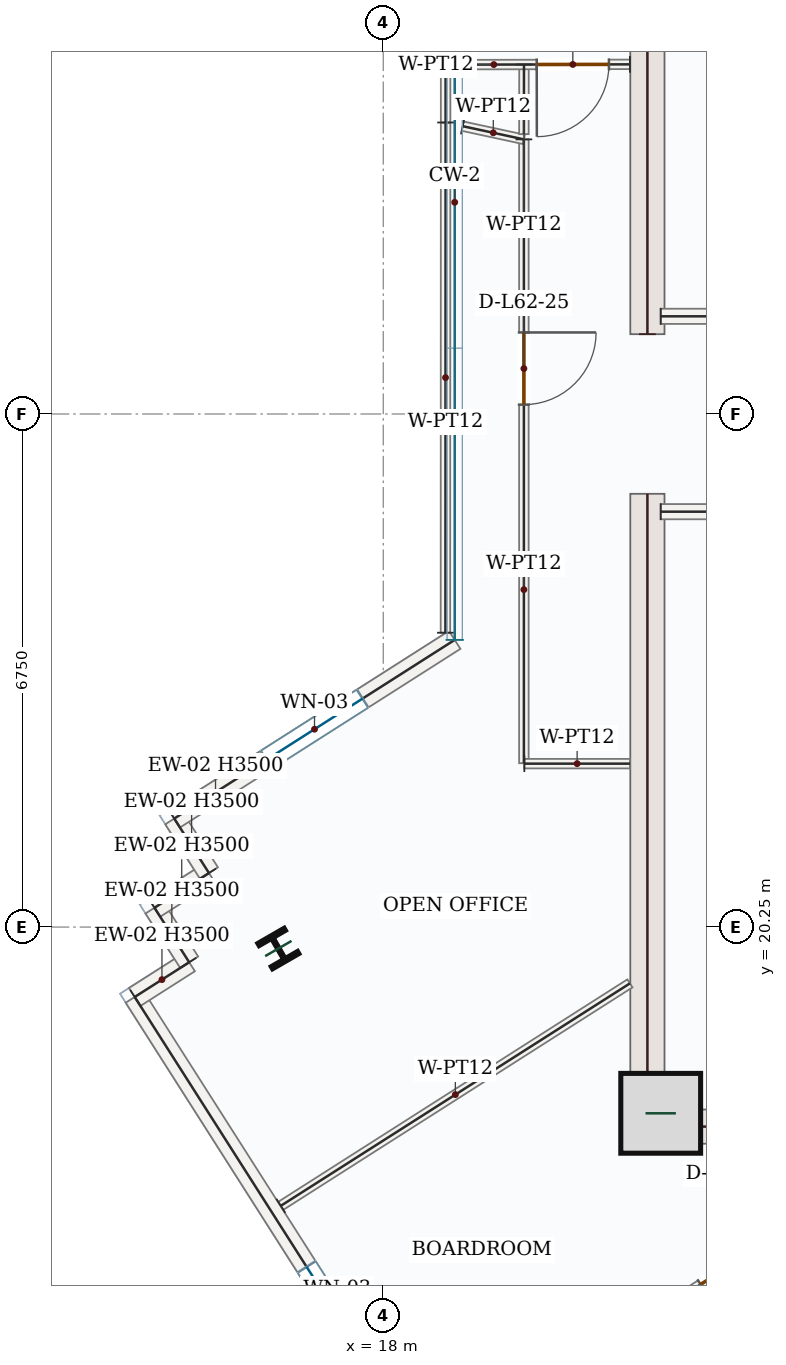
"""IFC4 building model, lengths in metres.
Left out: names, types, materials, properties, quantities, classifications, styles, units other than length and angle.
Written with IfcOpenShell. Run it as: python <this file> out.ifc"""

import sys

from ifc_helpers import new_model, si_unit, direction, frame, frame_2d, origin, origin_2d, place, context, subcontext, project, spatial, rectangle, i_section, extrude, source, transform, mapped, element, fill, save


model = new_model("IFC4")
c1 = context("Model", 3, precision=1e-05, world=origin(), true_north=direction((0.0, 1.0)))
c2 = subcontext(c1, "Body", "Model", "MODEL_VIEW")
j1 = project(units=[si_unit("LENGTHUNIT", "METRE"), si_unit("PLANEANGLEUNIT", "RADIAN")], contexts=[c1])
p1 = place(None, origin())
s1 = spatial("IfcSite", under=j1, at=p1, CompositionType="ELEMENT")
p2 = place(p1, origin())
s2 = spatial("IfcBuilding", under=s1, at=p2, CompositionType="ELEMENT")
p3 = place(p2, frame((0.0, 0.0, 261.6)))
s3 = spatial("IfcBuildingStorey", under=s2, at=p3, CompositionType="ELEMENT", Elevation=261.6)
m1 = source(origin(), c2, "Body", "SweptSolid", [
    extrude(rectangle(XDim=8.55, YDim=0.45, at=frame_2d((4.275, 0.0))), origin(), (0.0, 0.0, 1.0), 3.5),
])
for number, where, z_axis, x_axis in (
    (1, (21.475, 17.4, 0.0), (0.0, 0.0, 1.0), (0.0, 1.0, 0.0)),
    (2, (21.475, 28.05, 0.0), (0.0, 0.0, 1.0), (0.0, 1.0, 0.0)),
):
    element("IfcWall", number, at=place(p3, frame(where, z_axis=z_axis, x_axis=x_axis)), inside=s3, PredefinedType="SHEAR", context=c2, shape_type="MappedRepresentation", body=[
        mapped(m1, transform((0.0, 0.0, 0.0), x_axis=(1.0, 0.0, 0.0), y_axis=(0.0, 1.0, 0.0), z_axis=(0.0, 0.0, 1.0), scale=1.0)),
    ])
m2 = source(origin(), c2, "Body", "SweptSolid", [
    extrude(rectangle(XDim=7.1, YDim=0.45, at=frame_2d((3.55, 0.0))), origin(), (0.0, 0.0, 1.0), 3.5),
])
p4 = place(p3, frame((21.7, 17.625, 0.0), z_axis=(0.0, 0.0, 1.0), x_axis=(1.0, 0.0, 0.0)))
e3 = element("IfcWall", 3, at=p4, inside=s3, PredefinedType="SHEAR", context=c2, shape_type="MappedRepresentation", body=[
    mapped(m2, transform((0.0, 0.0, 0.0), x_axis=(1.0, 0.0, 0.0), y_axis=(0.0, 1.0, 0.0), z_axis=(0.0, 0.0, 1.0), scale=1.0)),
])
m3 = source(origin(), c2, "Body", "SweptSolid", [
    extrude(rectangle(XDim=1.05, YDim=1.05, at=origin_2d()), origin(), (0.0, 0.0, 1.0), 3.75),
])
p5 = place(p3, frame((21.65, 17.8, 0.0), z_axis=(0.0, 0.0, 1.0), x_axis=(1.0, 0.0, 0.0)))
e4 = element("IfcColumn", 4, at=p5, inside=s3, PredefinedType="COLUMN", context=c2, shape_type="MappedRepresentation", body=[
    mapped(m3, transform((0.0, 0.0, 0.0), x_axis=(1.0, 0.0, 0.0), y_axis=(0.0, 1.0, 0.0), z_axis=(0.0, 0.0, 1.0), scale=1.0)),
])
m4 = source(origin(), c2, "Body", "SweptSolid", [
    extrude(i_section(OverallWidth=0.399, OverallDepth=0.386, WebThickness=0.021, FlangeThickness=0.033, FilletRadius=0.018, at=origin_2d()), origin(), (0.0, 0.0, 1.0), 3.75),
])
p6 = place(p3, frame((16.62, 19.968, 0.0), z_axis=(0.0, 0.0, 1.0), x_axis=(0.866025403784, 0.5, 0.0)))
e5 = element("IfcColumn", 5, at=p6, inside=s3, PredefinedType="COLUMN", context=c2, shape_type="MappedRepresentation", body=[
    mapped(m4, transform((0.0, 0.0, 0.0), x_axis=(1.0, 0.0, 0.0), y_axis=(0.0, 1.0, 0.0), z_axis=(0.0, 0.0, 1.0), scale=1.0)),
])
p7 = place(p3, frame((20.06, 10.964, 0.0), z_axis=(0.0, 0.0, 1.0), x_axis=(-0.537314949054, 0.843381672508, 0.0)))
e6 = element("IfcWall", 6, at=p7, inside=s3, PredefinedType="SOLIDWALL", context=c2, shape_type="SweptSolid", body=[
    extrude(rectangle(XDim=9.92, YDim=0.28, at=frame_2d((4.96, 0.0))), origin(), (0.0, 0.0, 1.0), 3.5),
])
p8 = place(p7, frame((4.21, 0.0, 0.85)))
e7 = element("IfcOpeningElement", 7, at=p8, cuts=e6, PredefinedType="OPENING", context=c2, shape_type="SweptSolid", body=[
    extrude(rectangle(XDim=1.5, YDim=1.5, at=frame_2d((0.75, 0.75))), frame((0.0, 0.15, 0.0), z_axis=(0.0, -1.0, 0.0), x_axis=(1.0, 0.0, 0.0)), (0.0, 0.0, 1.0), 0.3),
])
m5 = source(origin(), c2, "Body", "SweptSolid", [
    extrude(rectangle(XDim=0.85, YDim=0.28, at=frame_2d((0.425, 0.0))), origin(), (0.0, 0.0, 1.0), 3.5),
])
p9 = place(p3, frame((14.73, 19.33, 0.0), z_axis=(0.0, 0.0, 1.0), x_axis=(0.843401251716, 0.537284215853, 0.0)))
e8 = element("IfcWall", 8, at=p9, inside=s3, PredefinedType="SOLIDWALL", context=c2, shape_type="MappedRepresentation", body=[
    mapped(m5, transform((0.0, 0.0, 0.0), x_axis=(1.0, 0.0, 0.0), y_axis=(0.0, 1.0, 0.0), z_axis=(0.0, 0.0, 1.0), scale=1.0)),
])
m6 = source(origin(), c2, "Body", "SweptSolid", [
    extrude(rectangle(XDim=0.85, YDim=0.28, at=frame_2d((0.425, 0.0))), origin(), (0.0, 0.0, 1.0), 3.5),
])
for number, where, z_axis, x_axis in (
    (9, (15.447, 19.787, 0.0), (0.0, 0.0, 1.0), (-0.537, 0.843, 0.0)),
    (10, (14.99, 20.504, 0.0), (0.0, 0.0, 1.0), (0.843, 0.537, 0.0)),
    (11, (15.707, 20.961, 0.0), (0.0, 0.0, 1.0), (-0.537, 0.843, 0.0)),
):
    element("IfcWall", number, at=place(p3, frame(where, z_axis=z_axis, x_axis=x_axis)), inside=s3, PredefinedType="SOLIDWALL", context=c2, shape_type="MappedRepresentation", body=[
        mapped(m6, transform((0.0, 0.0, 0.0), x_axis=(1.0, 0.0, 0.0), y_axis=(0.0, 1.0, 0.0), z_axis=(0.0, 0.0, 1.0), scale=1.0)),
    ])
p10 = place(p3, frame((15.25, 21.677, 0.0), z_axis=(0.0, 0.0, 1.0), x_axis=(0.843383352012, 0.537312312857, 0.0)))
e12 = element("IfcWall", 12, at=p10, inside=s3, PredefinedType="SOLIDWALL", context=c2, shape_type="SweptSolid", body=[
    extrude(rectangle(XDim=4.375, YDim=0.28, at=frame_2d((2.188, 0.0))), origin(), (0.0, 0.0, 1.0), 3.5),
])
p11 = place(p10, frame((1.438, 0.0, 0.85)))
e13 = element("IfcOpeningElement", 13, at=p11, cuts=e12, PredefinedType="OPENING", context=c2, shape_type="SweptSolid", body=[
    extrude(rectangle(XDim=1.5, YDim=1.5, at=frame_2d((0.75, 0.75))), frame((0.0, 0.15, 0.0), z_axis=(0.0, -1.0, 0.0), x_axis=(1.0, 0.0, 0.0)), (0.0, 0.0, 1.0), 0.3),
])
m7 = source(origin(), c2, "Body", "SweptSolid", [
    extrude(rectangle(XDim=4.25, YDim=0.2, at=frame_2d((2.125, 0.0))), origin(), (0.0, 0.0, 1.0), 3.5),
])
for number, where, z_axis, x_axis in (
    (14, (21.65, 25.715, 0.0), (0.0, 0.0, 1.0), (1.0, 0.0, 0.0)),
    (15, (21.65, 28.285, 0.0), (0.0, 0.0, 1.0), (1.0, 0.0, 0.0)),
):
    element("IfcWall", number, at=place(p3, frame(where, z_axis=z_axis, x_axis=x_axis)), inside=s3, PredefinedType="SOLIDWALL", context=c2, shape_type="MappedRepresentation", body=[
        mapped(m7, transform((0.0, 0.0, 0.0), x_axis=(1.0, 0.0, 0.0), y_axis=(0.0, 1.0, 0.0), z_axis=(0.0, 0.0, 1.0), scale=1.0)),
    ])
p12 = place(p3, frame((25.073, 17.395, 0.0), z_axis=(0.0, 0.0, 1.0), x_axis=(-0.843398332862, -0.537288797693, 0.0)))
e16 = element("IfcWall", 16, at=p12, inside=s3, PredefinedType="PARTITIONING", context=c2, shape_type="SweptSolid", body=[
    extrude(rectangle(XDim=5.924, YDim=0.125, at=frame_2d((2.962, 0.0))), origin(), (0.0, 0.0, 1.0), 3.5),
])
p13 = place(p12, frame((2.487, 0.0, 0.0)))
e17 = element("IfcOpeningElement", 17, at=p13, cuts=e16, PredefinedType="OPENING", context=c2, shape_type="SweptSolid", body=[
    extrude(rectangle(XDim=0.95, YDim=2.15, at=frame_2d((0.475, 1.075))), frame((0.0, 0.073, 0.0), z_axis=(0.0, -1.0, 0.0), x_axis=(1.0, 0.0, 0.0)), (0.0, 0.0, 1.0), 0.145),
])
m8 = source(origin(), c2, "Body", "SweptSolid", [
    extrude(rectangle(XDim=5.446, YDim=0.125, at=frame_2d((2.723, 0.0))), origin(), (0.0, 0.0, 1.0), 3.5),
])
p14 = place(p3, frame((16.652, 16.583, 0.0), z_axis=(0.0, 0.0, 1.0), x_axis=(0.843395566027, 0.537293140851, 0.0)))
e18 = element("IfcWall", 18, at=p14, inside=s3, PredefinedType="PARTITIONING", context=c2, shape_type="MappedRepresentation", body=[
    mapped(m8, transform((0.0, 0.0, 0.0), x_axis=(1.0, 0.0, 0.0), y_axis=(0.0, 1.0, 0.0), z_axis=(0.0, 0.0, 1.0), scale=1.0)),
])
p15 = place(p3, frame((19.85, 30.613, 0.0), z_axis=(0.0, 0.0, 1.0), x_axis=(0.0, -1.0, 0.0)))
e19 = element("IfcWall", 19, at=p15, inside=s3, PredefinedType="PARTITIONING", context=c2, shape_type="SweptSolid", body=[
    extrude(rectangle(XDim=8.207, YDim=0.125, at=frame_2d((4.104, 0.0))), origin(), (0.0, 0.0, 1.0), 3.5),
])
p16 = place(p15, frame((2.54, 0.0, 0.0)))
e20 = element("IfcOpeningElement", 20, at=p16, cuts=e19, PredefinedType="OPENING", context=c2, shape_type="SweptSolid", body=[
    extrude(rectangle(XDim=0.95, YDim=2.15, at=frame_2d((0.475, 1.075))), frame((0.0, 0.073, 0.0), z_axis=(0.0, -1.0, 0.0), x_axis=(1.0, 0.0, 0.0)), (0.0, 0.0, 1.0), 0.145),
])
m9 = source(origin(), c2, "Body", "SweptSolid", [
    extrude(rectangle(XDim=1.389, YDim=0.125, at=frame_2d((0.695, 0.0))), origin(), (0.0, 0.0, 1.0), 3.5),
])
p17 = place(p3, frame((19.856, 22.4, 0.0), z_axis=(0.0, 0.0, 1.0), x_axis=(1.0, 0.0, 0.0)))
e21 = element("IfcWall", 21, at=p17, inside=s3, PredefinedType="PARTITIONING", context=c2, shape_type="MappedRepresentation", body=[
    mapped(m9, transform((0.0, 0.0, 0.0), x_axis=(1.0, 0.0, 0.0), y_axis=(0.0, 1.0, 0.0), z_axis=(0.0, 0.0, 1.0), scale=1.0)),
])
m10 = source(origin(), c2, "Body", "SweptSolid", [
    extrude(rectangle(XDim=6.713, YDim=0.125, at=frame_2d((3.356, 0.0))), origin(), (0.0, 0.0, 1.0), 3.5),
])
p18 = place(p3, frame((18.818, 24.122, 0.0), z_axis=(0.0, 0.0, 1.0), x_axis=(0.000327332225, 0.999999946427, 0.0)))
e22 = element("IfcWall", 22, at=p18, inside=s3, PredefinedType="PARTITIONING", context=c2, shape_type="MappedRepresentation", body=[
    mapped(m10, transform((0.0, 0.0, 0.0), x_axis=(1.0, 0.0, 0.0), y_axis=(0.0, 1.0, 0.0), z_axis=(0.0, 0.0, 1.0), scale=1.0)),
])
m11 = source(origin(), c2, "Body", "SweptSolid", [
    extrude(rectangle(XDim=0.824, YDim=0.125, at=frame_2d((0.412, 0.0))), origin(), (0.0, 0.0, 1.0), 3.5),
])
p19 = place(p3, frame((19.045, 30.786, 0.0), z_axis=(0.0, 0.0, 1.0), x_axis=(0.977541402347, -0.210743461816, 0.0)))
e23 = element("IfcWall", 23, at=p19, inside=s3, PredefinedType="PARTITIONING", context=c2, shape_type="MappedRepresentation", body=[
    mapped(m11, transform((0.0, 0.0, 0.0), x_axis=(1.0, 0.0, 0.0), y_axis=(0.0, 1.0, 0.0), z_axis=(0.0, 0.0, 1.0), scale=1.0)),
])
m12 = source(origin(), c2, "Body", "SweptSolid", [
    extrude(rectangle(XDim=0.916, YDim=0.125, at=frame_2d((0.458, 0.0))), origin(), (0.0, 0.0, 1.0), 3.5),
])
p20 = place(p3, frame((19.851, 31.598, 0.0), z_axis=(0.0, 0.0, 1.0), x_axis=(-0.001332976688, -0.999999111586, 0.0)))
e24 = element("IfcWall", 24, at=p20, inside=s3, PredefinedType="PARTITIONING", context=c2, shape_type="MappedRepresentation", body=[
    mapped(m12, transform((0.0, 0.0, 0.0), x_axis=(1.0, 0.0, 0.0), y_axis=(0.0, 1.0, 0.0), z_axis=(0.0, 0.0, 1.0), scale=1.0)),
])
m13 = source(origin(), c2, "Body", "SweptSolid", [
    extrude(rectangle(XDim=4.757, YDim=0.125, at=frame_2d((2.378, 0.0))), origin(), (0.0, 0.0, 1.0), 3.5),
])
p21 = place(p3, frame((18.82, 30.835, 0.0), z_axis=(0.0, 0.0, 1.0), x_axis=(0.0, 1.0, 0.0)))
e25 = element("IfcWall", 25, at=p21, inside=s3, PredefinedType="PARTITIONING", context=c2, shape_type="MappedRepresentation", body=[
    mapped(m13, transform((0.0, 0.0, 0.0), x_axis=(1.0, 0.0, 0.0), y_axis=(0.0, 1.0, 0.0), z_axis=(0.0, 0.0, 1.0), scale=1.0)),
])
p22 = place(p3, frame((21.245, 31.6, 0.0), z_axis=(0.0, 0.0, 1.0), x_axis=(-0.999998798684, -0.001550042425, 0.0)))
e26 = element("IfcWall", 26, at=p22, inside=s3, PredefinedType="PARTITIONING", context=c2, shape_type="SweptSolid", body=[
    extrude(rectangle(XDim=2.205, YDim=0.125, at=frame_2d((1.103, 0.0))), origin(), (0.0, 0.0, 1.0), 3.5),
])
p23 = place(p22, frame((0.276, 0.0, 0.0)))
e27 = element("IfcOpeningElement", 27, at=p23, cuts=e26, PredefinedType="OPENING", context=c2, shape_type="SweptSolid", body=[
    extrude(rectangle(XDim=0.95, YDim=2.15, at=frame_2d((0.475, 1.075))), frame((0.0, 0.073, 0.0), z_axis=(0.0, -1.0, 0.0), x_axis=(1.0, 0.0, 0.0)), (0.0, 0.0, 1.0), 0.145),
])
m14 = source(origin(), c2, "Body", "SweptSolid", [
    extrude(rectangle(XDim=1.5, YDim=1.5, at=frame_2d((0.75, 0.75))), frame((0.0, 0.03, 0.0), z_axis=(0.0, -1.0, 0.0), x_axis=(1.0, 0.0, 0.0)), (0.0, 0.0, 1.0), 0.06),
])
p24 = place(p8, origin())
e28 = element("IfcWindow", 28, at=p24, inside=s3, PartitioningType="SINGLE_PANEL", PredefinedType="WINDOW", context=c2, shape_type="MappedRepresentation", body=[
    mapped(m14, transform((0.0, 0.0, 0.0), x_axis=(1.0, 0.0, 0.0), y_axis=(0.0, 1.0, 0.0), z_axis=(0.0, 0.0, 1.0), scale=1.0)),
])
fill(e7, e28)
p25 = place(p11, origin())
e29 = element("IfcWindow", 29, at=p25, inside=s3, PartitioningType="SINGLE_PANEL", PredefinedType="WINDOW", context=c2, shape_type="MappedRepresentation", body=[
    mapped(m14, transform((0.0, 0.0, 0.0), x_axis=(1.0, 0.0, 0.0), y_axis=(0.0, 1.0, 0.0), z_axis=(0.0, 0.0, 1.0), scale=1.0)),
])
fill(e13, e29)
m15 = source(origin(), c2, "Body", "SweptSolid", [
    extrude(rectangle(XDim=0.95, YDim=2.15, at=frame_2d((0.475, 1.075))), frame((0.0, 0.025, 0.0), z_axis=(0.0, -1.0, 0.0), x_axis=(1.0, 0.0, 0.0)), (0.0, 0.0, 1.0), 0.05),
])
p26 = place(p23, origin())
e30 = element("IfcDoor", 30, at=p26, inside=s3, OperationType="SINGLE_SWING_RIGHT", PredefinedType="DOOR", context=c2, shape_type="MappedRepresentation", body=[
    mapped(m15, transform((0.0, 0.0, 0.0), x_axis=(1.0, 0.0, 0.0), y_axis=(0.0, 1.0, 0.0), z_axis=(0.0, 0.0, 1.0), scale=1.0)),
])
fill(e27, e30)
p27 = place(p16, origin())
e31 = element("IfcDoor", 31, at=p27, inside=s3, OperationType="SINGLE_SWING_LEFT", PredefinedType="DOOR", context=c2, shape_type="MappedRepresentation", body=[
    mapped(m15, transform((0.0, 0.0, 0.0), x_axis=(1.0, 0.0, 0.0), y_axis=(0.0, 1.0, 0.0), z_axis=(0.0, 0.0, 1.0), scale=1.0)),
])
fill(e20, e31)
p28 = place(p13, origin())
e32 = element("IfcDoor", 32, at=p28, inside=s3, OperationType="SINGLE_SWING_RIGHT", PredefinedType="DOOR", context=c2, shape_type="MappedRepresentation", body=[
    mapped(m15, transform((0.0, 0.0, 0.0), x_axis=(1.0, 0.0, 0.0), y_axis=(0.0, 1.0, 0.0), z_axis=(0.0, 0.0, 1.0), scale=1.0)),
])
fill(e17, e32)
save(model, sys.argv[1])
